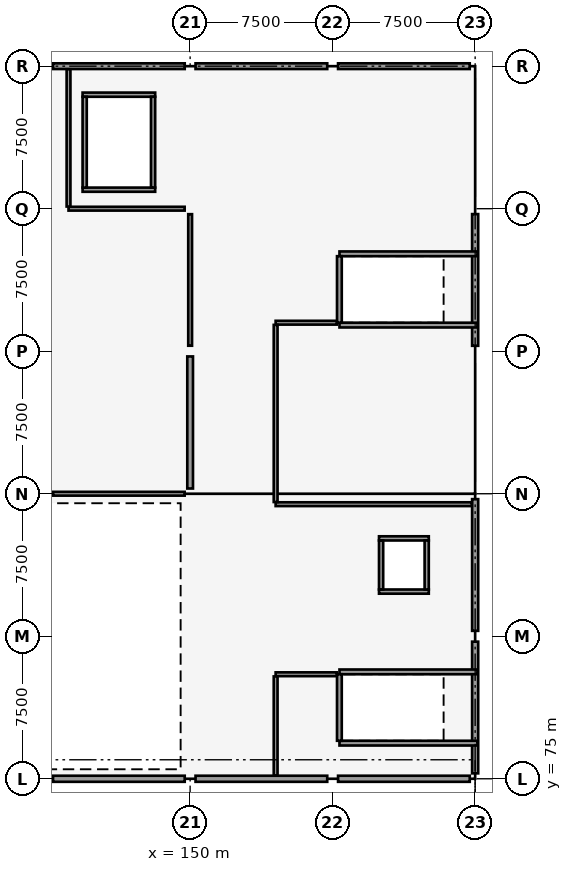
"""IFC4 building model, lengths in metres.
Left out: names, types, materials, properties, quantities, classifications, styles, units other than length and angle.
Written with IfcOpenShell. Run it as: python <this file> out.ifc"""

import sys

from ifc_helpers import new_model, si_unit, direction, frame, frame_2d, origin, origin_2d, place, context, subcontext, project, spatial, rectangle, extrude, element, fill, save


model = new_model("IFC4")
c1 = context("Model", 3, precision=1e-05, world=origin(), true_north=direction((0.0, 1.0)))
c2 = subcontext(c1, "Body", "Model", "MODEL_VIEW")
j1 = project(units=[si_unit("LENGTHUNIT", "METRE"), si_unit("PLANEANGLEUNIT", "RADIAN")], contexts=[c1])
p1 = place(None, origin())
s1 = spatial("IfcSite", under=j1, at=p1, CompositionType="ELEMENT")
p2 = place(p1, origin())
s2 = spatial("IfcBuilding", under=s1, at=p2, CompositionType="ELEMENT")
p3 = place(p2, frame((0.0, 0.0, 13.2)))
s3 = spatial("IfcBuildingStorey", under=s2, at=p3, CompositionType="ELEMENT", Elevation=13.2)
for number, where, z_axis, x_axis in (
    (1, (142.5, 75.0, 0.0), (0.0, 0.0, 1.0), (1.0, 0.0, 0.0)),
    (2, (142.5, 90.0, 0.0), (0.0, 0.0, 1.0), (1.0, 0.0, 0.0)),
    (3, (142.5, 97.5, 0.0), (0.0, 0.0, 1.0), (1.0, 0.0, 0.0)),
    (4, (142.5, 105.0, 0.0), (0.0, 0.0, 1.0), (1.0, 0.0, 0.0)),
    (5, (142.5, 112.5, 0.0), (0.0, 0.0, 1.0), (1.0, 0.0, 0.0)),
    (6, (150.0, 75.0, 0.0), (0.0, 0.0, 1.0), (1.0, 0.0, 0.0)),
    (7, (150.0, 82.5, 0.0), (0.0, 0.0, 1.0), (1.0, 0.0, 0.0)),
    (8, (150.0, 90.0, 0.0), (0.0, 0.0, 1.0), (1.0, 0.0, 0.0)),
    (9, (150.0, 97.5, 0.0), (0.0, 0.0, 1.0), (1.0, 0.0, 0.0)),
    (10, (150.0, 105.0, 0.0), (0.0, 0.0, 1.0), (1.0, 0.0, 0.0)),
    (11, (150.0, 112.5, 0.0), (0.0, 0.0, 1.0), (1.0, 0.0, 0.0)),
    (12, (157.5, 75.0, 0.0), (0.0, 0.0, 1.0), (1.0, 0.0, 0.0)),
    (13, (157.5, 82.5, 0.0), (0.0, 0.0, 1.0), (1.0, 0.0, 0.0)),
    (14, (157.5, 90.0, 0.0), (0.0, 0.0, 1.0), (1.0, 0.0, 0.0)),
    (15, (157.5, 97.5, 0.0), (0.0, 0.0, 1.0), (1.0, 0.0, 0.0)),
    (16, (157.5, 105.0, 0.0), (0.0, 0.0, 1.0), (1.0, 0.0, 0.0)),
    (17, (157.5, 112.5, 0.0), (0.0, 0.0, 1.0), (1.0, 0.0, 0.0)),
    (18, (165.0, 75.0, 0.0), (0.0, 0.0, 1.0), (1.0, 0.0, 0.0)),
    (19, (165.0, 82.5, 0.0), (0.0, 0.0, 1.0), (1.0, 0.0, 0.0)),
    (20, (165.0, 90.0, 0.0), (0.0, 0.0, 1.0), (1.0, 0.0, 0.0)),
    (21, (165.0, 97.5, 0.0), (0.0, 0.0, 1.0), (1.0, 0.0, 0.0)),
    (22, (165.0, 105.0, 0.0), (0.0, 0.0, 1.0), (1.0, 0.0, 0.0)),
    (23, (165.0, 112.5, 0.0), (0.0, 0.0, 1.0), (1.0, 0.0, 0.0)),
):
    element("IfcColumn", number, at=place(p3, frame(where, z_axis=z_axis, x_axis=x_axis)), inside=s3, PredefinedType="COLUMN", context=c2, shape_type="SweptSolid", body=[
        extrude(rectangle(XDim=0.55, YDim=0.55, at=origin_2d()), origin(), (0.0, 0.0, 1.0), 3.9),
    ])
p4 = place(p3, frame((150.0, 90.275, 0.0), z_axis=(0.0, 0.0, 1.0), x_axis=(0.0, 1.0, 0.0)))
e24 = element("IfcWall", 24, at=p4, inside=s3, PredefinedType="SHEAR", context=c2, shape_type="SweptSolid", body=[
    extrude(rectangle(XDim=6.95, YDim=0.3, at=frame_2d((3.475, 0.0))), origin(), (0.0, 0.0, 1.0), 3.6),
])
p5 = place(p3, frame((142.785, 75.0, 0.0), z_axis=(0.0, 0.0, 1.0), x_axis=(1.0, 0.0, 0.0)))
e25 = element("IfcWall", 25, at=p5, inside=s3, PredefinedType="SOLIDWALL", context=c2, shape_type="SweptSolid", body=[
    extrude(rectangle(XDim=6.93, YDim=0.32, at=frame_2d((3.465, 0.0))), origin(), (0.0, 0.0, 1.0), 2.59),
])
p6 = place(p3, frame((142.785, 112.5, 0.0), z_axis=(0.0, 0.0, 1.0), x_axis=(1.0, 0.0, 0.0)))
e26 = element("IfcWall", 26, at=p6, inside=s3, PredefinedType="SOLIDWALL", context=c2, shape_type="SweptSolid", body=[
    extrude(rectangle(XDim=6.93, YDim=0.3, at=frame_2d((3.465, 0.0))), origin(), (0.0, 0.0, 1.0), 2.84),
])
p7 = place(p3, frame((150.285, 75.0, 0.0), z_axis=(0.0, 0.0, 1.0), x_axis=(1.0, 0.0, 0.0)))
e27 = element("IfcWall", 27, at=p7, inside=s3, PredefinedType="SOLIDWALL", context=c2, shape_type="SweptSolid", body=[
    extrude(rectangle(XDim=6.93, YDim=0.32, at=frame_2d((3.465, 0.0))), origin(), (0.0, 0.0, 1.0), 2.84),
])
p8 = place(p3, frame((150.285, 112.5, 0.0), z_axis=(0.0, 0.0, 1.0), x_axis=(1.0, 0.0, 0.0)))
e28 = element("IfcWall", 28, at=p8, inside=s3, PredefinedType="SOLIDWALL", context=c2, shape_type="SweptSolid", body=[
    extrude(rectangle(XDim=6.93, YDim=0.3, at=frame_2d((3.465, 0.0))), origin(), (0.0, 0.0, 1.0), 2.84),
])
p9 = place(p3, frame((157.785, 75.0, 0.0), z_axis=(0.0, 0.0, 1.0), x_axis=(1.0, 0.0, 0.0)))
e29 = element("IfcWall", 29, at=p9, inside=s3, PredefinedType="SOLIDWALL", context=c2, shape_type="SweptSolid", body=[
    extrude(rectangle(XDim=6.93, YDim=0.32, at=frame_2d((3.465, 0.0))), origin(), (0.0, 0.0, 1.0), 2.84),
])
p10 = place(p3, frame((157.785, 112.5, 0.0), z_axis=(0.0, 0.0, 1.0), x_axis=(1.0, 0.0, 0.0)))
e30 = element("IfcWall", 30, at=p10, inside=s3, PredefinedType="SOLIDWALL", context=c2, shape_type="SweptSolid", body=[
    extrude(rectangle(XDim=6.93, YDim=0.3, at=frame_2d((3.465, 0.0))), origin(), (0.0, 0.0, 1.0), 2.84),
])
for number, where, z_axis, x_axis in (
    (31, (165.0, 75.285, 0.0), (0.0, 0.0, 1.0), (0.0, 1.0, 0.0)),
    (32, (165.0, 82.785, 0.0), (0.0, 0.0, 1.0), (0.0, 1.0, 0.0)),
    (33, (165.0, 97.785, 0.0), (0.0, 0.0, 1.0), (0.0, 1.0, 0.0)),
):
    element("IfcWall", number, at=place(p3, frame(where, z_axis=z_axis, x_axis=x_axis)), inside=s3, PredefinedType="SOLIDWALL", context=c2, shape_type="SweptSolid", body=[
        extrude(rectangle(XDim=6.93, YDim=0.32, at=frame_2d((3.465, 0.0))), origin(), (0.0, 0.0, 1.0), 2.79),
    ])
p11 = place(p3, frame((157.86, 76.875, 0.0), z_axis=(0.0, 0.0, 1.0), x_axis=(1.0, 0.0, 0.0)))
e34 = element("IfcWall", 34, at=p11, inside=s3, PredefinedType="SOLIDWALL", context=c2, shape_type="SweptSolid", body=[
    extrude(rectangle(XDim=7.26, YDim=0.25, at=frame_2d((3.63, 0.0))), origin(), (0.0, 0.0, 1.0), 3.62),
])
p12 = place(p3, frame((157.86, 80.625, 0.0), z_axis=(0.0, 0.0, 1.0), x_axis=(1.0, 0.0, 0.0)))
e35 = element("IfcWall", 35, at=p12, inside=s3, PredefinedType="SOLIDWALL", context=c2, shape_type="SweptSolid", body=[
    extrude(rectangle(XDim=7.26, YDim=0.25, at=frame_2d((3.63, 0.0))), origin(), (0.0, 0.0, 1.0), 3.62),
])
p13 = place(p12, frame((5.71, 0.0, 0.0)))
e36 = element("IfcOpeningElement", 36, at=p13, cuts=e35, PredefinedType="OPENING", context=c2, shape_type="SweptSolid", body=[
    extrude(rectangle(XDim=1.1, YDim=2.15, at=frame_2d((0.55, 1.075))), frame((0.0, 0.135, 0.0), z_axis=(0.0, -1.0, 0.0), x_axis=(1.0, 0.0, 0.0)), (0.0, 0.0, 1.0), 0.27),
])
p14 = place(p3, frame((157.855, 77.0, 0.0), z_axis=(0.0, 0.0, 1.0), x_axis=(0.0, 1.0, 0.0)))
e37 = element("IfcWall", 37, at=p14, inside=s3, PredefinedType="SOLIDWALL", context=c2, shape_type="SweptSolid", body=[
    extrude(rectangle(XDim=3.5, YDim=0.25, at=frame_2d((1.75, 0.0))), origin(), (0.0, 0.0, 1.0), 3.62),
])
p15 = place(p3, frame((157.86, 98.875, 0.0), z_axis=(0.0, 0.0, 1.0), x_axis=(1.0, 0.0, 0.0)))
e38 = element("IfcWall", 38, at=p15, inside=s3, PredefinedType="SOLIDWALL", context=c2, shape_type="SweptSolid", body=[
    extrude(rectangle(XDim=7.26, YDim=0.25, at=frame_2d((3.63, 0.0))), origin(), (0.0, 0.0, 1.0), 3.62),
])
p16 = place(p3, frame((157.86, 102.625, 0.0), z_axis=(0.0, 0.0, 1.0), x_axis=(1.0, 0.0, 0.0)))
e39 = element("IfcWall", 39, at=p16, inside=s3, PredefinedType="SOLIDWALL", context=c2, shape_type="SweptSolid", body=[
    extrude(rectangle(XDim=7.26, YDim=0.25, at=frame_2d((3.63, 0.0))), origin(), (0.0, 0.0, 1.0), 3.62),
])
p17 = place(p16, frame((5.71, 0.0, 0.0)))
e40 = element("IfcOpeningElement", 40, at=p17, cuts=e39, PredefinedType="OPENING", context=c2, shape_type="SweptSolid", body=[
    extrude(rectangle(XDim=1.1, YDim=2.15, at=frame_2d((0.55, 1.075))), frame((0.0, 0.135, 0.0), z_axis=(0.0, -1.0, 0.0), x_axis=(1.0, 0.0, 0.0)), (0.0, 0.0, 1.0), 0.27),
])
p18 = place(p3, frame((157.855, 99.0, 0.0), z_axis=(0.0, 0.0, 1.0), x_axis=(0.0, 1.0, 0.0)))
e41 = element("IfcWall", 41, at=p18, inside=s3, PredefinedType="SOLIDWALL", context=c2, shape_type="SweptSolid", body=[
    extrude(rectangle(XDim=3.5, YDim=0.25, at=frame_2d((1.75, 0.0))), origin(), (0.0, 0.0, 1.0), 3.62),
])
for number, where, z_axis, x_axis in (
    (42, (159.94, 84.85, 0.0), (0.0, 0.0, 1.0), (1.0, 0.0, 0.0)),
    (43, (159.94, 87.65, 0.0), (0.0, 0.0, 1.0), (1.0, 0.0, 0.0)),
):
    element("IfcWall", number, at=place(p3, frame(where, z_axis=z_axis, x_axis=x_axis)), inside=s3, PredefinedType="SOLIDWALL", context=c2, shape_type="SweptSolid", body=[
        extrude(rectangle(XDim=2.62, YDim=0.22, at=frame_2d((1.31, 0.0))), origin(), (0.0, 0.0, 1.0), 3.62),
    ])
p19 = place(p3, frame((160.05, 84.96, 0.0), z_axis=(0.0, 0.0, 1.0), x_axis=(0.0, 1.0, 0.0)))
e44 = element("IfcWall", 44, at=p19, inside=s3, PredefinedType="SOLIDWALL", context=c2, shape_type="SweptSolid", body=[
    extrude(rectangle(XDim=2.58, YDim=0.22, at=frame_2d((1.29, 0.0))), origin(), (0.0, 0.0, 1.0), 3.62),
])
p20 = place(p19, frame((0.79, 0.0, 0.0)))
e45 = element("IfcOpeningElement", 45, at=p20, cuts=e44, PredefinedType="OPENING", context=c2, shape_type="SweptSolid", body=[
    extrude(rectangle(XDim=1.0, YDim=2.15, at=frame_2d((0.5, 1.075))), frame((0.0, 0.12, 0.0), z_axis=(0.0, -1.0, 0.0), x_axis=(1.0, 0.0, 0.0)), (0.0, 0.0, 1.0), 0.24),
])
p21 = place(p3, frame((162.45, 84.96, 0.0), z_axis=(0.0, 0.0, 1.0), x_axis=(0.0, 1.0, 0.0)))
e46 = element("IfcWall", 46, at=p21, inside=s3, PredefinedType="SOLIDWALL", context=c2, shape_type="SweptSolid", body=[
    extrude(rectangle(XDim=2.58, YDim=0.22, at=frame_2d((1.29, 0.0))), origin(), (0.0, 0.0, 1.0), 3.62),
])
p22 = place(p3, frame((144.34, 106.0, 0.0), z_axis=(0.0, 0.0, 1.0), x_axis=(1.0, 0.0, 0.0)))
e47 = element("IfcWall", 47, at=p22, inside=s3, PredefinedType="SOLIDWALL", context=c2, shape_type="SweptSolid", body=[
    extrude(rectangle(XDim=3.82, YDim=0.22, at=frame_2d((1.91, 0.0))), origin(), (0.0, 0.0, 1.0), 3.62),
])
p23 = place(p22, frame((0.81, 0.0, 0.0)))
e48 = element("IfcOpeningElement", 48, at=p23, cuts=e47, PredefinedType="OPENING", context=c2, shape_type="SweptSolid", body=[
    extrude(rectangle(XDim=2.2, YDim=2.35, at=frame_2d((1.1, 1.175))), frame((0.0, 0.12, 0.0), z_axis=(0.0, -1.0, 0.0), x_axis=(1.0, 0.0, 0.0)), (0.0, 0.0, 1.0), 0.24),
])
p24 = place(p3, frame((144.34, 111.0, 0.0), z_axis=(0.0, 0.0, 1.0), x_axis=(1.0, 0.0, 0.0)))
e49 = element("IfcWall", 49, at=p24, inside=s3, PredefinedType="SOLIDWALL", context=c2, shape_type="SweptSolid", body=[
    extrude(rectangle(XDim=3.82, YDim=0.22, at=frame_2d((1.91, 0.0))), origin(), (0.0, 0.0, 1.0), 3.62),
])
for number, where, z_axis, x_axis in (
    (50, (144.45, 106.11, 0.0), (0.0, 0.0, 1.0), (0.0, 1.0, 0.0)),
    (51, (148.05, 106.11, 0.0), (0.0, 0.0, 1.0), (0.0, 1.0, 0.0)),
):
    element("IfcWall", number, at=place(p3, frame(where, z_axis=z_axis, x_axis=x_axis)), inside=s3, PredefinedType="SOLIDWALL", context=c2, shape_type="SweptSolid", body=[
        extrude(rectangle(XDim=4.78, YDim=0.22, at=frame_2d((2.39, 0.0))), origin(), (0.0, 0.0, 1.0), 3.62),
    ])
p25 = place(p3, frame((143.6, 105.0, 0.0), z_axis=(0.0, 0.0, 1.0), x_axis=(1.0, 0.0, 0.0)))
e52 = element("IfcWall", 52, at=p25, inside=s3, PredefinedType="PARTITIONING", context=c2, shape_type="SweptSolid", body=[
    extrude(rectangle(XDim=6.111, YDim=0.2, at=frame_2d((3.055, 0.0))), origin(), (0.0, 0.0, 1.0), 2.54),
])
p26 = place(p3, frame((143.6, 105.114, 0.0), z_axis=(0.0, 0.0, 1.0), x_axis=(0.0, 1.0, 0.0)))
e53 = element("IfcWall", 53, at=p26, inside=s3, PredefinedType="PARTITIONING", context=c2, shape_type="SweptSolid", body=[
    extrude(rectangle(XDim=7.222, YDim=0.2, at=frame_2d((3.611, 0.0))), origin(), (0.0, 0.0, 1.0), 2.54),
])
p27 = place(p26, frame((2.786, 0.0, 0.0)))
e54 = element("IfcOpeningElement", 54, at=p27, cuts=e53, PredefinedType="OPENING", context=c2, shape_type="SweptSolid", body=[
    extrude(rectangle(XDim=1.2, YDim=2.15, at=frame_2d((0.6, 1.075))), frame((0.0, 0.11, 0.0), z_axis=(0.0, -1.0, 0.0), x_axis=(1.0, 0.0, 0.0)), (0.0, 0.0, 1.0), 0.22),
])
p28 = place(p3, frame((154.5, 80.5, 0.0), z_axis=(0.0, 0.0, 1.0), x_axis=(1.0, 0.0, 0.0)))
e55 = element("IfcWall", 55, at=p28, inside=s3, PredefinedType="PARTITIONING", context=c2, shape_type="SweptSolid", body=[
    extrude(rectangle(XDim=3.216, YDim=0.2, at=frame_2d((1.608, 0.0))), origin(), (0.0, 0.0, 1.0), 2.97),
])
p29 = place(p3, frame((154.5, 75.174, 0.0), z_axis=(0.0, 0.0, 1.0), x_axis=(0.0, 1.0, 0.0)))
e56 = element("IfcWall", 56, at=p29, inside=s3, PredefinedType="PARTITIONING", context=c2, shape_type="SweptSolid", body=[
    extrude(rectangle(XDim=5.212, YDim=0.2, at=frame_2d((2.606, 0.0))), origin(), (0.0, 0.0, 1.0), 2.84),
])
p30 = place(p3, frame((154.5, 89.45, 0.0), z_axis=(0.0, 0.0, 1.0), x_axis=(1.0, 0.0, 0.0)))
e57 = element("IfcWall", 57, at=p30, inside=s3, PredefinedType="PARTITIONING", context=c2, shape_type="SweptSolid", body=[
    extrude(rectangle(XDim=10.326, YDim=0.2, at=frame_2d((5.163, 0.0))), origin(), (0.0, 0.0, 1.0), 2.64),
])
p31 = place(p3, frame((154.5, 99.0, 0.0), z_axis=(0.0, 0.0, 1.0), x_axis=(1.0, 0.0, 0.0)))
e58 = element("IfcWall", 58, at=p31, inside=s3, PredefinedType="PARTITIONING", context=c2, shape_type="SweptSolid", body=[
    extrude(rectangle(XDim=3.216, YDim=0.2, at=frame_2d((1.608, 0.0))), origin(), (0.0, 0.0, 1.0), 2.97),
])
p32 = place(p3, frame((154.5, 89.564, 0.0), z_axis=(0.0, 0.0, 1.0), x_axis=(0.0, 1.0, 0.0)))
e59 = element("IfcWall", 59, at=p32, inside=s3, PredefinedType="PARTITIONING", context=c2, shape_type="SweptSolid", body=[
    extrude(rectangle(XDim=9.322, YDim=0.2, at=frame_2d((4.661, 0.0))), origin(), (0.0, 0.0, 1.0), 2.64),
])
p33 = place(p32, frame((4.086, 0.0, 0.0)))
e60 = element("IfcOpeningElement", 60, at=p33, cuts=e59, PredefinedType="OPENING", context=c2, shape_type="SweptSolid", body=[
    extrude(rectangle(XDim=1.1, YDim=2.15, at=frame_2d((0.55, 1.075))), frame((0.0, 0.11, 0.0), z_axis=(0.0, -1.0, 0.0), x_axis=(1.0, 0.0, 0.0)), (0.0, 0.0, 1.0), 0.22),
])
p34 = place(p3, frame((142.789, 90.0, 0.0), z_axis=(0.0, 0.0, 1.0), x_axis=(1.0, 0.0, 0.0)))
e61 = element("IfcWall", 61, at=p34, inside=s3, PredefinedType="PARTITIONING", context=c2, shape_type="SweptSolid", body=[
    extrude(rectangle(XDim=6.922, YDim=0.2, at=frame_2d((3.461, 0.0))), origin(), (0.0, 0.0, 1.0), 2.54),
])
p35 = place(p3, frame((150.0, 97.789, 0.0), z_axis=(0.0, 0.0, 1.0), x_axis=(0.0, 1.0, 0.0)))
e62 = element("IfcWall", 62, at=p35, inside=s3, PredefinedType="PARTITIONING", context=c2, shape_type="SweptSolid", body=[
    extrude(rectangle(XDim=6.922, YDim=0.2, at=frame_2d((3.461, 0.0))), origin(), (0.0, 0.0, 1.0), 2.54),
])
p36 = place(p35, frame((2.661, 0.0, 0.0)))
e63 = element("IfcOpeningElement", 63, at=p36, cuts=e62, PredefinedType="OPENING", context=c2, shape_type="SweptSolid", body=[
    extrude(rectangle(XDim=1.6, YDim=2.15, at=frame_2d((0.8, 1.075))), frame((0.0, 0.11, 0.0), z_axis=(0.0, -1.0, 0.0), x_axis=(1.0, 0.0, 0.0)), (0.0, 0.0, 1.0), 0.22),
])
p37 = place(p13, origin())
e64 = element("IfcDoor", 64, at=p37, inside=s3, OperationType="SINGLE_SWING_RIGHT", PredefinedType="DOOR", context=c2, shape_type="SweptSolid", body=[
    extrude(rectangle(XDim=1.1, YDim=2.15, at=frame_2d((0.55, 1.075))), frame((0.0, 0.025, 0.0), z_axis=(0.0, -1.0, 0.0), x_axis=(1.0, 0.0, 0.0)), (0.0, 0.0, 1.0), 0.05),
])
fill(e36, e64)
p38 = place(p17, origin())
e65 = element("IfcDoor", 65, at=p38, inside=s3, OperationType="SINGLE_SWING_RIGHT", PredefinedType="DOOR", context=c2, shape_type="SweptSolid", body=[
    extrude(rectangle(XDim=1.1, YDim=2.15, at=frame_2d((0.55, 1.075))), frame((0.0, 0.025, 0.0), z_axis=(0.0, -1.0, 0.0), x_axis=(1.0, 0.0, 0.0)), (0.0, 0.0, 1.0), 0.05),
])
fill(e40, e65)
p39 = place(p20, origin())
e66 = element("IfcDoor", 66, at=p39, inside=s3, OperationType="SLIDING_TO_LEFT", PredefinedType="DOOR", context=c2, shape_type="SweptSolid", body=[
    extrude(rectangle(XDim=1.0, YDim=2.15, at=frame_2d((0.5, 1.075))), frame((0.0, 0.025, 0.0), z_axis=(0.0, -1.0, 0.0), x_axis=(1.0, 0.0, 0.0)), (0.0, 0.0, 1.0), 0.05),
])
fill(e45, e66)
p40 = place(p23, origin())
e67 = element("IfcDoor", 67, at=p40, inside=s3, OperationType="DOUBLE_DOOR_SLIDING", PredefinedType="DOOR", context=c2, shape_type="SweptSolid", body=[
    extrude(rectangle(XDim=2.2, YDim=2.35, at=frame_2d((1.1, 1.175))), frame((0.0, 0.025, 0.0), z_axis=(0.0, -1.0, 0.0), x_axis=(1.0, 0.0, 0.0)), (0.0, 0.0, 1.0), 0.05),
])
fill(e48, e67)
p41 = place(p27, origin())
e68 = element("IfcDoor", 68, at=p41, inside=s3, OperationType="SINGLE_SWING_RIGHT", PredefinedType="DOOR", context=c2, shape_type="SweptSolid", body=[
    extrude(rectangle(XDim=1.2, YDim=2.15, at=frame_2d((0.6, 1.075))), frame((0.0, 0.025, 0.0), z_axis=(0.0, -1.0, 0.0), x_axis=(1.0, 0.0, 0.0)), (0.0, 0.0, 1.0), 0.05),
])
fill(e54, e68)
p42 = place(p33, origin())
e69 = element("IfcDoor", 69, at=p42, inside=s3, OperationType="SINGLE_SWING_LEFT", PredefinedType="DOOR", context=c2, shape_type="SweptSolid", body=[
    extrude(rectangle(XDim=1.1, YDim=2.15, at=frame_2d((0.55, 1.075))), frame((0.0, 0.025, 0.0), z_axis=(0.0, -1.0, 0.0), x_axis=(1.0, 0.0, 0.0)), (0.0, 0.0, 1.0), 0.05),
])
fill(e60, e69)
p43 = place(p36, origin())
e70 = element("IfcDoor", 70, at=p43, inside=s3, OperationType="SINGLE_SWING_LEFT", PredefinedType="DOOR", context=c2, shape_type="SweptSolid", body=[
    extrude(rectangle(XDim=1.6, YDim=2.15, at=frame_2d((0.8, 1.075))), frame((0.0, 0.025, 0.0), z_axis=(0.0, -1.0, 0.0), x_axis=(1.0, 0.0, 0.0)), (0.0, 0.0, 1.0), 0.05),
])
fill(e63, e70)
save(model, sys.argv[1])
